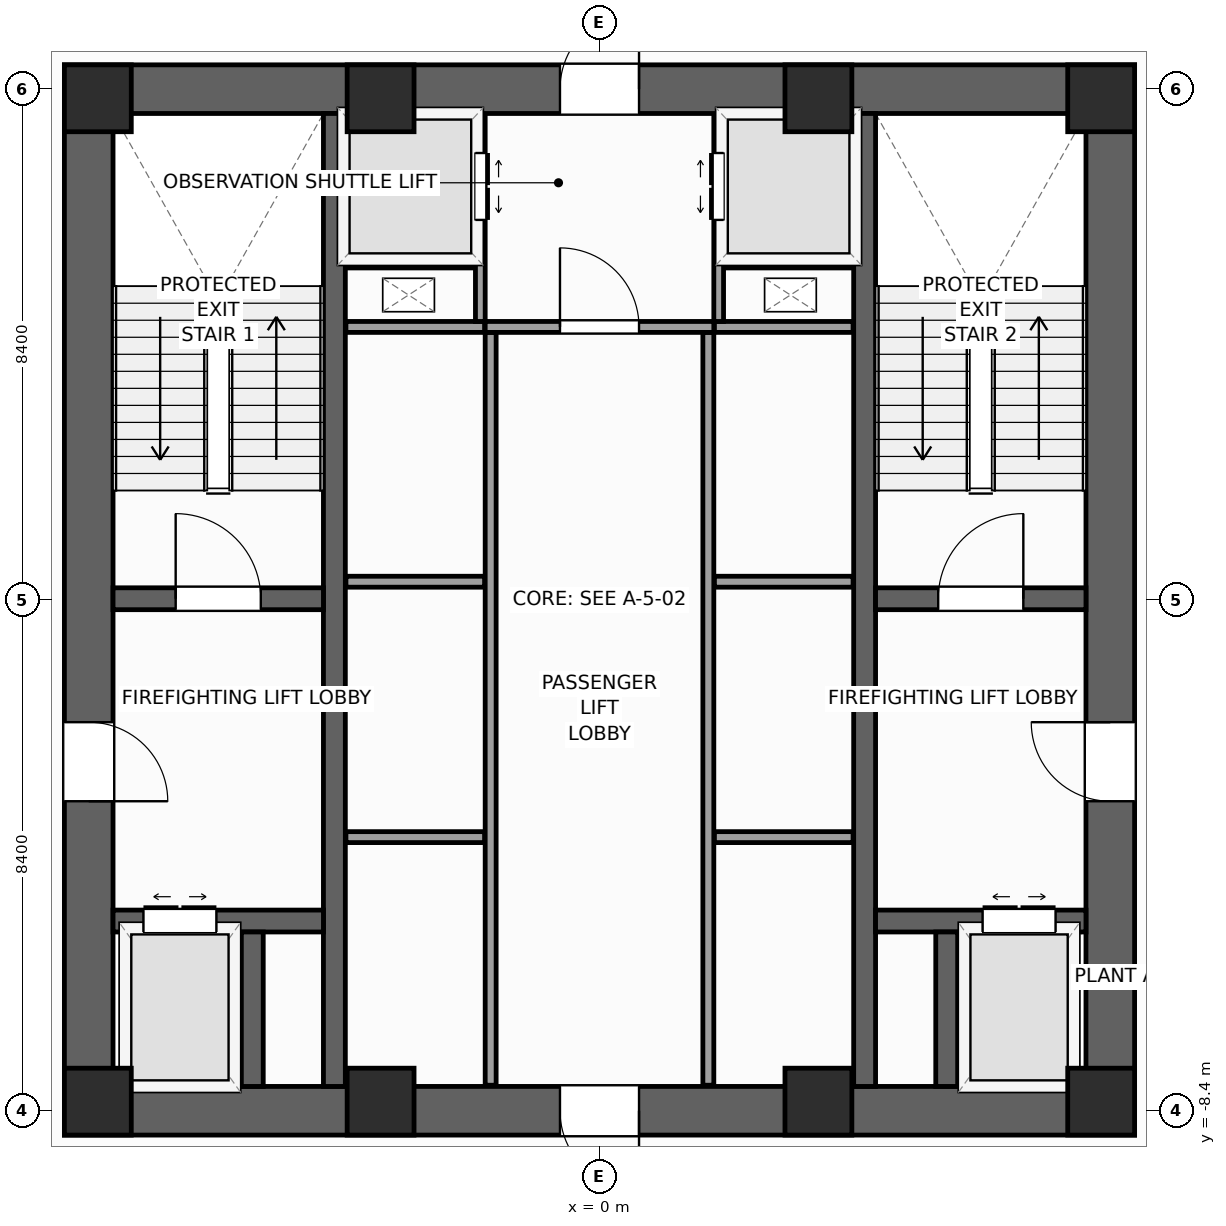
"""IFC4 building model, lengths in metres.
Left out: names, types, materials, properties, quantities, classifications, styles, units other than length and angle.
Written with IfcOpenShell. Run it as: python <this file> out.ifc"""

import sys

from ifc_helpers import new_model, si_unit, direction, frame, frame_2d, origin, origin_2d, place, context, subcontext, project, spatial, rectangle, extrude, source, transform, mapped, element, fill, save


model = new_model("IFC4")
c1 = context("Model", 3, precision=1e-05, world=origin(), true_north=direction((0.0, 1.0)))
c2 = subcontext(c1, "Body", "Model", "MODEL_VIEW")
j1 = project(units=[si_unit("LENGTHUNIT", "METRE"), si_unit("PLANEANGLEUNIT", "RADIAN")], contexts=[c1])
p1 = place(None, origin())
s1 = spatial("IfcSite", under=j1, at=p1, CompositionType="ELEMENT")
p2 = place(p1, origin())
s2 = spatial("IfcBuilding", under=s1, at=p2, CompositionType="ELEMENT")
p3 = place(p2, frame((0.0, 0.0, -4.5)))
s3 = spatial("IfcBuildingStorey", under=s2, at=p3, CompositionType="ELEMENT", Elevation=-4.5)
p4 = place(p3, frame((-8.8, -8.4, 0.0), z_axis=(0.0, 0.0, 1.0), x_axis=(1.0, 0.0, 0.0)))
e1 = element("IfcWall", 1, at=p4, inside=s3, PredefinedType="SHEAR", context=c2, shape_type="SweptSolid", body=[
    extrude(rectangle(XDim=17.6, YDim=0.8, at=frame_2d((8.8, 0.0))), origin(), (0.0, 0.0, 1.0), 4.5),
])
p5 = place(p4, frame((8.15, 0.0, 0.0)))
e2 = element("IfcOpeningElement", 2, at=p5, cuts=e1, PredefinedType="OPENING", context=c2, shape_type="SweptSolid", body=[
    extrude(rectangle(XDim=1.3, YDim=2.2, at=frame_2d((0.65, 1.1))), frame((0.0, 0.41, 0.0), z_axis=(0.0, -1.0, 0.0), x_axis=(1.0, 0.0, 0.0)), (0.0, 0.0, 1.0), 0.82),
])
p6 = place(p3, frame((-8.8, 8.4, 0.0), z_axis=(0.0, 0.0, 1.0), x_axis=(1.0, 0.0, 0.0)))
e3 = element("IfcWall", 3, at=p6, inside=s3, PredefinedType="SHEAR", context=c2, shape_type="SweptSolid", body=[
    extrude(rectangle(XDim=17.6, YDim=0.8, at=frame_2d((8.8, 0.0))), origin(), (0.0, 0.0, 1.0), 4.5),
])
p7 = place(p6, frame((8.15, 0.0, 0.0)))
e4 = element("IfcOpeningElement", 4, at=p7, cuts=e3, PredefinedType="OPENING", context=c2, shape_type="SweptSolid", body=[
    extrude(rectangle(XDim=1.3, YDim=2.2, at=frame_2d((0.65, 1.1))), frame((0.0, 0.41, 0.0), z_axis=(0.0, -1.0, 0.0), x_axis=(1.0, 0.0, 0.0)), (0.0, 0.0, 1.0), 0.82),
])
p8 = place(p3, frame((-8.4, -8.0, 0.0), z_axis=(0.0, 0.0, 1.0), x_axis=(0.0, 1.0, 0.0)))
e5 = element("IfcWall", 5, at=p8, inside=s3, PredefinedType="SHEAR", context=c2, shape_type="SweptSolid", body=[
    extrude(rectangle(XDim=16.0, YDim=0.8, at=frame_2d((8.0, 0.0))), origin(), (0.0, 0.0, 1.0), 4.5),
])
p9 = place(p8, frame((4.69, 0.0, 0.0)))
e6 = element("IfcOpeningElement", 6, at=p9, cuts=e5, PredefinedType="OPENING", context=c2, shape_type="SweptSolid", body=[
    extrude(rectangle(XDim=1.3, YDim=2.2, at=frame_2d((0.65, 1.1))), frame((0.0, 0.41, 0.0), z_axis=(0.0, -1.0, 0.0), x_axis=(1.0, 0.0, 0.0)), (0.0, 0.0, 1.0), 0.82),
])
p10 = place(p3, frame((8.4, -8.0, 0.0), z_axis=(0.0, 0.0, 1.0), x_axis=(0.0, 1.0, 0.0)))
e7 = element("IfcWall", 7, at=p10, inside=s3, PredefinedType="SHEAR", context=c2, shape_type="SweptSolid", body=[
    extrude(rectangle(XDim=16.0, YDim=0.8, at=frame_2d((8.0, 0.0))), origin(), (0.0, 0.0, 1.0), 4.5),
])
p11 = place(p10, frame((4.69, 0.0, 0.0)))
e8 = element("IfcOpeningElement", 8, at=p11, cuts=e7, PredefinedType="OPENING", context=c2, shape_type="SweptSolid", body=[
    extrude(rectangle(XDim=1.3, YDim=2.2, at=frame_2d((0.65, 1.1))), frame((0.0, 0.41, 0.0), z_axis=(0.0, -1.0, 0.0), x_axis=(1.0, 0.0, 0.0)), (0.0, 0.0, 1.0), 0.82),
])
for number, where, z_axis, x_axis in (
    (9, (-4.36, -8.0, 0.0), (0.0, 0.0, 1.0), (0.0, 1.0, 0.0)),
    (10, (4.36, -8.0, 0.0), (0.0, 0.0, 1.0), (0.0, 1.0, 0.0)),
):
    element("IfcWall", number, at=place(p3, frame(where, z_axis=z_axis, x_axis=x_axis)), inside=s3, PredefinedType="SHEAR", context=c2, shape_type="SweptSolid", body=[
        extrude(rectangle(XDim=16.0, YDim=0.36, at=frame_2d((8.0, 0.0))), origin(), (0.0, 0.0, 1.0), 4.5),
    ])
p12 = place(p3, frame((-8.0, 0.02, 0.0), z_axis=(0.0, 0.0, 1.0), x_axis=(1.0, 0.0, 0.0)))
e11 = element("IfcWall", 11, at=p12, inside=s3, PredefinedType="SHEAR", context=c2, shape_type="SweptSolid", body=[
    extrude(rectangle(XDim=3.46, YDim=0.36, at=frame_2d((1.73, 0.0))), origin(), (0.0, 0.0, 1.0), 4.5),
])
p13 = place(p12, frame((1.03, 0.0, 0.0)))
e12 = element("IfcOpeningElement", 12, at=p13, cuts=e11, PredefinedType="OPENING", context=c2, shape_type="SweptSolid", body=[
    extrude(rectangle(XDim=1.4, YDim=2.2, at=frame_2d((0.7, 1.1))), frame((0.0, 0.19, 0.0), z_axis=(0.0, -1.0, 0.0), x_axis=(1.0, 0.0, 0.0)), (0.0, 0.0, 1.0), 0.38),
])
p14 = place(p3, frame((4.54, 0.02, 0.0), z_axis=(0.0, 0.0, 1.0), x_axis=(1.0, 0.0, 0.0)))
e13 = element("IfcWall", 13, at=p14, inside=s3, PredefinedType="SHEAR", context=c2, shape_type="SweptSolid", body=[
    extrude(rectangle(XDim=3.46, YDim=0.36, at=frame_2d((1.73, 0.0))), origin(), (0.0, 0.0, 1.0), 4.5),
])
p15 = place(p14, frame((1.03, 0.0, 0.0)))
e14 = element("IfcOpeningElement", 14, at=p15, cuts=e13, PredefinedType="OPENING", context=c2, shape_type="SweptSolid", body=[
    extrude(rectangle(XDim=1.4, YDim=2.2, at=frame_2d((0.7, 1.1))), frame((0.0, 0.19, 0.0), z_axis=(0.0, -1.0, 0.0), x_axis=(1.0, 0.0, 0.0)), (0.0, 0.0, 1.0), 0.38),
])
p16 = place(p3, frame((-8.0, -5.28, 0.0), z_axis=(0.0, 0.0, 1.0), x_axis=(1.0, 0.0, 0.0)))
e15 = element("IfcWall", 15, at=p16, inside=s3, PredefinedType="SHEAR", context=c2, shape_type="SweptSolid", body=[
    extrude(rectangle(XDim=3.46, YDim=0.36, at=frame_2d((1.73, 0.0))), origin(), (0.0, 0.0, 1.0), 4.5),
])
p17 = place(p16, frame((0.5, 0.0, 0.0)))
e16 = element("IfcOpeningElement", 16, at=p17, cuts=e15, PredefinedType="OPENING", context=c2, shape_type="SweptSolid", body=[
    extrude(rectangle(XDim=1.2, YDim=2.25, at=frame_2d((0.6, 1.125))), frame((0.0, 0.19, 0.0), z_axis=(0.0, -1.0, 0.0), x_axis=(1.0, 0.0, 0.0)), (0.0, 0.0, 1.0), 0.38),
])
p18 = place(p3, frame((4.54, -5.28, 0.0), z_axis=(0.0, 0.0, 1.0), x_axis=(1.0, 0.0, 0.0)))
e17 = element("IfcWall", 17, at=p18, inside=s3, PredefinedType="SHEAR", context=c2, shape_type="SweptSolid", body=[
    extrude(rectangle(XDim=3.46, YDim=0.36, at=frame_2d((1.73, 0.0))), origin(), (0.0, 0.0, 1.0), 4.5),
])
p19 = place(p18, frame((1.76, 0.0, 0.0)))
e18 = element("IfcOpeningElement", 18, at=p19, cuts=e17, PredefinedType="OPENING", context=c2, shape_type="SweptSolid", body=[
    extrude(rectangle(XDim=1.2, YDim=2.25, at=frame_2d((0.6, 1.125))), frame((0.0, 0.19, 0.0), z_axis=(0.0, -1.0, 0.0), x_axis=(1.0, 0.0, 0.0)), (0.0, 0.0, 1.0), 0.38),
])
for number, where, z_axis, x_axis in (
    (19, (-5.71, -8.0, 0.0), (0.0, 0.0, 1.0), (0.0, 1.0, 0.0)),
    (20, (5.71, -8.0, 0.0), (0.0, 0.0, 1.0), (0.0, 1.0, 0.0)),
):
    element("IfcWall", number, at=place(p3, frame(where, z_axis=z_axis, x_axis=x_axis)), inside=s3, PredefinedType="SHEAR", context=c2, shape_type="SweptSolid", body=[
        extrude(rectangle(XDim=2.54, YDim=0.36, at=frame_2d((1.27, 0.0))), origin(), (0.0, 0.0, 1.0), 4.5),
    ])
m1 = source(origin(), c2, "Body", "SweptSolid", [
    extrude(rectangle(XDim=1.1, YDim=1.1, at=origin_2d()), origin(), (0.0, 0.0, 1.0), 4.5),
])
for number, where, z_axis, x_axis in (
    (21, (-8.25, -8.25, 0.0), (0.0, 0.0, 1.0), (1.0, 0.0, 0.0)),
    (22, (8.25, -8.25, 0.0), (0.0, 0.0, 1.0), (1.0, 0.0, 0.0)),
    (23, (8.25, 8.25, 0.0), (0.0, 0.0, 1.0), (1.0, 0.0, 0.0)),
    (24, (-8.25, 8.25, 0.0), (0.0, 0.0, 1.0), (1.0, 0.0, 0.0)),
    (25, (-3.6, -8.25, 0.0), (0.0, 0.0, 1.0), (1.0, 0.0, 0.0)),
    (26, (3.6, -8.25, 0.0), (0.0, 0.0, 1.0), (1.0, 0.0, 0.0)),
    (27, (-3.6, 8.25, 0.0), (0.0, 0.0, 1.0), (1.0, 0.0, 0.0)),
    (28, (3.6, 8.25, 0.0), (0.0, 0.0, 1.0), (1.0, 0.0, 0.0)),
):
    element("IfcColumn", number, at=place(p3, frame(where, z_axis=z_axis, x_axis=x_axis)), inside=s3, PredefinedType="PILASTER", context=c2, shape_type="MappedRepresentation", body=[
        mapped(m1, transform((0.0, 0.0, 0.0), scale=1.0)),
    ])
for number, where, z_axis, x_axis in (
    (29, (-1.79, -7.98, 0.0), (0.0, 0.0, 1.0), (0.0, 1.0, 0.0)),
    (30, (1.79, -7.98, 0.0), (0.0, 0.0, 1.0), (0.0, 1.0, 0.0)),
):
    element("IfcWall", number, at=place(p3, frame(where, z_axis=z_axis, x_axis=x_axis)), inside=s3, PredefinedType="PARTITIONING", context=c2, shape_type="SweptSolid", body=[
        extrude(rectangle(XDim=12.38, YDim=0.18, at=frame_2d((6.19, 0.0))), origin(), (0.0, 0.0, 1.0), 4.1),
    ])
p20 = place(p3, frame((-1.88, 4.49, 0.0), z_axis=(0.0, 0.0, 1.0), x_axis=(1.0, 0.0, 0.0)))
e31 = element("IfcWall", 31, at=p20, inside=s3, PredefinedType="PARTITIONING", context=c2, shape_type="SweptSolid", body=[
    extrude(rectangle(XDim=3.76, YDim=0.18, at=frame_2d((1.88, 0.0))), origin(), (0.0, 0.0, 1.0), 4.1),
])
p21 = place(p20, frame((1.23, 0.0, 0.0)))
e32 = element("IfcOpeningElement", 32, at=p21, cuts=e31, PredefinedType="OPENING", context=c2, shape_type="SweptSolid", body=[
    extrude(rectangle(XDim=1.3, YDim=2.2, at=frame_2d((0.65, 1.1))), frame((0.0, 0.1, 0.0), z_axis=(0.0, -1.0, 0.0), x_axis=(1.0, 0.0, 0.0)), (0.0, 0.0, 1.0), 0.2),
])
for number, where, z_axis, x_axis in (
    (33, (-4.17, -3.9, 0.0), (0.0, 0.0, 1.0), (1.0, 0.0, 0.0)),
    (34, (1.89, -3.9, 0.0), (0.0, 0.0, 1.0), (1.0, 0.0, 0.0)),
    (35, (-4.17, 0.3, 0.0), (0.0, 0.0, 1.0), (1.0, 0.0, 0.0)),
    (36, (1.89, 0.3, 0.0), (0.0, 0.0, 1.0), (1.0, 0.0, 0.0)),
    (37, (-4.17, 4.49, 0.0), (0.0, 0.0, 1.0), (1.0, 0.0, 0.0)),
    (38, (1.89, 4.49, 0.0), (0.0, 0.0, 1.0), (1.0, 0.0, 0.0)),
):
    element("IfcWall", number, at=place(p3, frame(where, z_axis=z_axis, x_axis=x_axis)), inside=s3, PredefinedType="PARTITIONING", context=c2, shape_type="SweptSolid", body=[
        extrude(rectangle(XDim=2.28, YDim=0.18, at=frame_2d((1.14, 0.0))), origin(), (0.0, 0.0, 1.0), 4.1),
    ])
p22 = place(p3, frame((-1.96, 4.58, 0.0), z_axis=(0.0, 0.0, 1.0), x_axis=(0.0, 1.0, 0.0)))
e39 = element("IfcWall", 39, at=p22, inside=s3, PredefinedType="PARTITIONING", context=c2, shape_type="SweptSolid", body=[
    extrude(rectangle(XDim=3.4, YDim=0.16, at=frame_2d((1.7, 0.0))), origin(), (0.0, 0.0, 1.0), 4.1),
])
p23 = place(p22, frame((1.67, 0.0, 0.0)))
e40 = element("IfcOpeningElement", 40, at=p23, cuts=e39, PredefinedType="OPENING", context=c2, shape_type="SweptSolid", body=[
    extrude(rectangle(XDim=1.1, YDim=2.2, at=frame_2d((0.55, 1.1))), frame((0.0, 0.09, 0.0), z_axis=(0.0, -1.0, 0.0), x_axis=(1.0, 0.0, 0.0)), (0.0, 0.0, 1.0), 0.18),
])
p24 = place(p3, frame((1.96, 4.58, 0.0), z_axis=(0.0, 0.0, 1.0), x_axis=(0.0, 1.0, 0.0)))
e41 = element("IfcWall", 41, at=p24, inside=s3, PredefinedType="PARTITIONING", context=c2, shape_type="SweptSolid", body=[
    extrude(rectangle(XDim=3.4, YDim=0.16, at=frame_2d((1.7, 0.0))), origin(), (0.0, 0.0, 1.0), 4.1),
])
p25 = place(p24, frame((1.67, 0.0, 0.0)))
e42 = element("IfcOpeningElement", 42, at=p25, cuts=e41, PredefinedType="OPENING", context=c2, shape_type="SweptSolid", body=[
    extrude(rectangle(XDim=1.1, YDim=2.2, at=frame_2d((0.55, 1.1))), frame((0.0, 0.09, 0.0), z_axis=(0.0, -1.0, 0.0), x_axis=(1.0, 0.0, 0.0)), (0.0, 0.0, 1.0), 0.18),
])
for number, where, z_axis, x_axis in (
    (43, (-4.16, 5.52, 0.0), (0.0, 0.0, 1.0), (1.0, 0.0, 0.0)),
    (44, (2.06, 5.52, 0.0), (0.0, 0.0, 1.0), (1.0, 0.0, 0.0)),
):
    element("IfcWall", number, at=place(p3, frame(where, z_axis=z_axis, x_axis=x_axis)), inside=s3, PredefinedType="PARTITIONING", context=c2, shape_type="SweptSolid", body=[
        extrude(rectangle(XDim=2.1, YDim=0.12, at=frame_2d((1.05, 0.0))), origin(), (0.0, 0.0, 1.0), 4.1),
    ])
m2 = source(origin(), c2, "Body", "SweptSolid", [
    extrude(rectangle(XDim=1.4, YDim=2.2, at=frame_2d((0.7, 1.1))), frame((0.0, 0.025, 0.0), z_axis=(0.0, -1.0, 0.0), x_axis=(1.0, 0.0, 0.0)), (0.0, 0.0, 1.0), 0.05),
])
p26 = place(p13, origin())
e45 = element("IfcDoor", 45, at=p26, inside=s3, OperationType="SINGLE_SWING_LEFT", PredefinedType="DOOR", context=c2, shape_type="MappedRepresentation", body=[
    mapped(m2, transform((0.0, 0.0, 0.0), scale=1.0)),
])
fill(e12, e45)
p27 = place(p15, origin())
e46 = element("IfcDoor", 46, at=p27, inside=s3, OperationType="SINGLE_SWING_RIGHT", PredefinedType="DOOR", context=c2, shape_type="MappedRepresentation", body=[
    mapped(m2, transform((0.0, 0.0, 0.0), scale=1.0)),
])
fill(e14, e46)
m3 = source(origin(), c2, "Body", "SweptSolid", [
    extrude(rectangle(XDim=1.3, YDim=2.2, at=frame_2d((0.65, 1.1))), frame((0.0, 0.025, 0.0), z_axis=(0.0, -1.0, 0.0), x_axis=(1.0, 0.0, 0.0)), (0.0, 0.0, 1.0), 0.05),
])
p28 = place(p9, frame((1.3, 0.0, 0.0), z_axis=(0.0, 0.0, 1.0), x_axis=(-1.0, 0.0, 0.0)))
e47 = element("IfcDoor", 47, at=p28, inside=s3, OperationType="SINGLE_SWING_LEFT", PredefinedType="DOOR", context=c2, shape_type="MappedRepresentation", body=[
    mapped(m3, transform((0.0, 0.0, 0.0), scale=1.0)),
])
fill(e6, e47)
p29 = place(p11, origin())
e48 = element("IfcDoor", 48, at=p29, inside=s3, OperationType="SINGLE_SWING_RIGHT", PredefinedType="DOOR", context=c2, shape_type="MappedRepresentation", body=[
    mapped(m3, transform((0.0, 0.0, 0.0), scale=1.0)),
])
fill(e8, e48)
p30 = place(p5, frame((1.3, 0.0, 0.0), z_axis=(0.0, 0.0, 1.0), x_axis=(-1.0, 0.0, 0.0)))
e49 = element("IfcDoor", 49, at=p30, inside=s3, OperationType="SINGLE_SWING_RIGHT", PredefinedType="DOOR", context=c2, shape_type="MappedRepresentation", body=[
    mapped(m3, transform((0.0, 0.0, 0.0), scale=1.0)),
])
fill(e2, e49)
m4 = source(origin(), c2, "Body", "SweptSolid", [
    extrude(rectangle(XDim=1.2, YDim=2.25, at=frame_2d((0.6, 1.125))), frame((0.0, 0.025, 0.0), z_axis=(0.0, -1.0, 0.0), x_axis=(1.0, 0.0, 0.0)), (0.0, 0.0, 1.0), 0.05),
])
p31 = place(p17, origin())
e50 = element("IfcDoor", 50, at=p31, inside=s3, OperationType="DOUBLE_DOOR_SLIDING", PredefinedType="DOOR", context=c2, shape_type="MappedRepresentation", body=[
    mapped(m4, transform((0.0, 0.0, 0.0), scale=1.0)),
])
fill(e16, e50)
p32 = place(p19, origin())
e51 = element("IfcDoor", 51, at=p32, inside=s3, OperationType="DOUBLE_DOOR_SLIDING", PredefinedType="DOOR", context=c2, shape_type="MappedRepresentation", body=[
    mapped(m4, transform((0.0, 0.0, 0.0), scale=1.0)),
])
fill(e18, e51)
p33 = place(p21, origin())
e52 = element("IfcDoor", 52, at=p33, inside=s3, OperationType="SINGLE_SWING_LEFT", PredefinedType="DOOR", context=c2, shape_type="MappedRepresentation", body=[
    mapped(m3, transform((0.0, 0.0, 0.0), scale=1.0)),
])
fill(e32, e52)
p34 = place(p7, origin())
e53 = element("IfcDoor", 53, at=p34, inside=s3, OperationType="SINGLE_SWING_RIGHT", PredefinedType="DOOR", context=c2, shape_type="MappedRepresentation", body=[
    mapped(m3, transform((0.0, 0.0, 0.0), scale=1.0)),
])
fill(e4, e53)
m5 = source(origin(), c2, "Body", "SweptSolid", [
    extrude(rectangle(XDim=1.1, YDim=2.2, at=frame_2d((0.55, 1.1))), frame((0.0, 0.025, 0.0), z_axis=(0.0, -1.0, 0.0), x_axis=(1.0, 0.0, 0.0)), (0.0, 0.0, 1.0), 0.05),
])
p35 = place(p23, frame((1.1, 0.0, 0.0), z_axis=(0.0, 0.0, 1.0), x_axis=(-1.0, 0.0, 0.0)))
e54 = element("IfcDoor", 54, at=p35, inside=s3, OperationType="DOUBLE_DOOR_SLIDING", PredefinedType="DOOR", context=c2, shape_type="MappedRepresentation", body=[
    mapped(m5, transform((0.0, 0.0, 0.0), scale=1.0)),
])
fill(e40, e54)
p36 = place(p25, origin())
e55 = element("IfcDoor", 55, at=p36, inside=s3, OperationType="DOUBLE_DOOR_SLIDING", PredefinedType="DOOR", context=c2, shape_type="MappedRepresentation", body=[
    mapped(m5, transform((0.0, 0.0, 0.0), scale=1.0)),
])
fill(e42, e55)
save(model, sys.argv[1])
